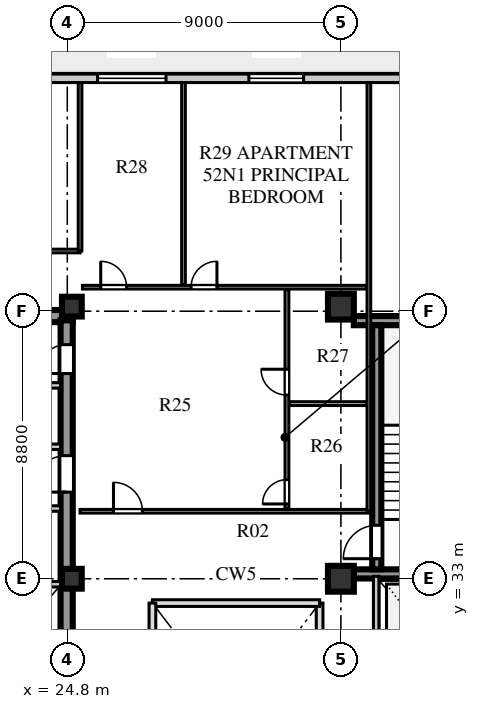
"""IFC4 building model, lengths in metres.
Left out: names, types, materials, properties, quantities, classifications, styles, units other than length and angle.
Written with IfcOpenShell. Run it as: python <this file> out.ifc"""

import sys

from ifc_helpers import new_model, si_unit, direction, frame, frame_2d, origin, origin_2d, place, context, subcontext, project, spatial, rectangle, extrude, element, fill, save


model = new_model("IFC4")
c1 = context("Model", 3, precision=1e-05, world=origin(), true_north=direction((0.0, 1.0)))
c2 = subcontext(c1, "Body", "Model", "MODEL_VIEW")
j1 = project(units=[si_unit("LENGTHUNIT", "METRE"), si_unit("PLANEANGLEUNIT", "RADIAN")], contexts=[c1])
p1 = place(None, origin())
s1 = spatial("IfcSite", under=j1, at=p1, CompositionType="ELEMENT")
p2 = place(p1, origin())
s2 = spatial("IfcBuilding", under=s1, at=p2, CompositionType="ELEMENT")
p3 = place(p2, frame((0.0, 0.0, 214.1)))
s3 = spatial("IfcBuildingStorey", under=s2, at=p3, CompositionType="ELEMENT", Elevation=214.1)
p4 = place(p3, frame((15.5, 41.64, 0.0), z_axis=(0.0, 0.0, 1.0), x_axis=(1.0, 0.0, 0.0)))
e1 = element("IfcWall", 1, at=p4, inside=s3, PredefinedType="SHEAR", context=c2, shape_type="SweptSolid", body=[
    extrude(rectangle(XDim=9.48, YDim=0.4, at=frame_2d((4.74, 0.0))), origin(), (0.0, 0.0, 1.0), 3.66),
])
p5 = place(p3, frame((24.78, 15.74, 0.0), z_axis=(0.0, 0.0, 1.0), x_axis=(0.0, 1.0, 0.0)))
e2 = element("IfcWall", 2, at=p5, inside=s3, PredefinedType="SHEAR", context=c2, shape_type="SweptSolid", body=[
    extrude(rectangle(XDim=25.76, YDim=0.4, at=frame_2d((12.88, 0.0))), origin(), (0.0, 0.0, 1.0), 3.66),
])
p6 = place(p5, frame((1.61, 0.0, 0.0)))
e3 = element("IfcOpeningElement", 3, at=p6, cuts=e2, PredefinedType="OPENING", context=c2, shape_type="SweptSolid", body=[
    extrude(rectangle(XDim=1.2, YDim=2.1, at=frame_2d((0.6, 1.05))), frame((0.0, 0.21, 0.0), z_axis=(0.0, -1.0, 0.0), x_axis=(1.0, 0.0, 0.0)), (0.0, 0.0, 1.0), 0.42),
])
p7 = place(p5, frame((6.78, 0.0, 0.0)))
e4 = element("IfcOpeningElement", 4, at=p7, cuts=e2, PredefinedType="OPENING", context=c2, shape_type="SweptSolid", body=[
    extrude(rectangle(XDim=0.85, YDim=2.06, at=frame_2d((0.425, 1.03))), frame((0.0, 0.21, 0.0), z_axis=(0.0, -1.0, 0.0), x_axis=(1.0, 0.0, 0.0)), (0.0, 0.0, 1.0), 0.42),
])
p8 = place(p5, frame((12.11, 0.0, 0.0)))
e5 = element("IfcOpeningElement", 5, at=p8, cuts=e2, PredefinedType="OPENING", context=c2, shape_type="SweptSolid", body=[
    extrude(rectangle(XDim=1.5, YDim=2.12, at=frame_2d((0.75, 1.06))), frame((0.0, 0.21, 0.0), z_axis=(0.0, -1.0, 0.0), x_axis=(1.0, 0.0, 0.0)), (0.0, 0.0, 1.0), 0.42),
])
p9 = place(p5, frame((20.11, 0.0, 0.0)))
e6 = element("IfcOpeningElement", 6, at=p9, cuts=e2, PredefinedType="OPENING", context=c2, shape_type="SweptSolid", body=[
    extrude(rectangle(XDim=1.2, YDim=2.12, at=frame_2d((0.6, 1.06))), frame((0.0, 0.21, 0.0), z_axis=(0.0, -1.0, 0.0), x_axis=(1.0, 0.0, 0.0)), (0.0, 0.0, 1.0), 0.42),
])
p10 = place(p5, frame((24.01, 0.0, 0.0)))
e7 = element("IfcOpeningElement", 7, at=p10, cuts=e2, PredefinedType="OPENING", context=c2, shape_type="SweptSolid", body=[
    extrude(rectangle(XDim=0.95, YDim=2.1, at=frame_2d((0.475, 1.05))), frame((0.0, 0.21, 0.0), z_axis=(0.0, -1.0, 0.0), x_axis=(1.0, 0.0, 0.0)), (0.0, 0.0, 1.0), 0.42),
])
for number, where, z_axis, x_axis in (
    (8, (34.225, 33.16, 0.0), (0.0, 0.0, 1.0), (1.0, 0.0, 0.0)),
    (9, (34.225, 41.49, 0.0), (0.0, 0.0, 1.0), (1.0, 0.0, 0.0)),
):
    element("IfcWall", number, at=place(p3, frame(where, z_axis=z_axis, x_axis=x_axis)), inside=s3, PredefinedType="SHEAR", context=c2, shape_type="SweptSolid", body=[
        extrude(rectangle(XDim=4.645, YDim=0.3, at=frame_2d((2.323, 0.0))), origin(), (0.0, 0.0, 1.0), 3.66),
    ])
p11 = place(p3, frame((34.98, 33.31, 0.0), z_axis=(0.0, 0.0, 1.0), x_axis=(0.0, 1.0, 0.0)))
e10 = element("IfcWall", 10, at=p11, inside=s3, PredefinedType="SHEAR", context=c2, shape_type="SweptSolid", body=[
    extrude(rectangle(XDim=8.03, YDim=0.3, at=frame_2d((4.015, 0.0))), origin(), (0.0, 0.0, 1.0), 3.66),
])
p12 = place(p11, frame((0.35, 0.0, 0.0)))
e11 = element("IfcOpeningElement", 11, at=p12, cuts=e10, PredefinedType="OPENING", context=c2, shape_type="SweptSolid", body=[
    extrude(rectangle(XDim=1.1, YDim=2.1, at=frame_2d((0.55, 1.05))), frame((0.0, 0.16, 0.0), z_axis=(0.0, -1.0, 0.0), x_axis=(1.0, 0.0, 0.0)), (0.0, 0.0, 1.0), 0.32),
])
for number, where, z_axis, x_axis in (
    (12, (24.95, 33.0, 0.0), (0.0, 0.0, 1.0), (1.0, 0.0, 0.0)),
    (13, (24.95, 41.95, 0.0), (0.0, 0.0, 1.0), (1.0, 0.0, 0.0)),
):
    element("IfcColumn", number, at=place(p3, frame(where, z_axis=z_axis, x_axis=x_axis)), inside=s3, PredefinedType="COLUMN", context=c2, shape_type="SweptSolid", body=[
        extrude(rectangle(XDim=0.65, YDim=0.65, at=origin_2d()), origin(), (0.0, 0.0, 1.0), 3.66),
    ])
for number, where, z_axis, x_axis in (
    (14, (33.8, 33.0, 0.0), (0.0, 0.0, 1.0), (1.0, 0.0, 0.0)),
    (15, (33.8, 41.95, 0.0), (0.0, 0.0, 1.0), (1.0, 0.0, 0.0)),
):
    element("IfcColumn", number, at=place(p3, frame(where, z_axis=z_axis, x_axis=x_axis)), inside=s3, PredefinedType="COLUMN", context=c2, shape_type="SweptSolid", body=[
        extrude(rectangle(XDim=0.85, YDim=0.85, at=origin_2d()), origin(), (0.0, 0.0, 1.0), 3.66),
    ])
p13 = place(p3, frame((45.55, 49.46, 0.0), z_axis=(0.0, 0.0, 1.0), x_axis=(-1.0, 0.0, 0.0)))
e16 = element("IfcWall", 16, at=p13, inside=s3, PredefinedType="STANDARD", context=c2, shape_type="SweptSolid", body=[
    extrude(rectangle(XDim=32.5, YDim=0.28, at=frame_2d((16.25, 0.0))), origin(), (0.0, 0.0, 1.0), 3.66),
])
p14 = place(p13, frame((30.55, 0.0, 0.0)))
e17 = element("IfcOpeningElement", 17, at=p14, cuts=e16, PredefinedType="OPENING", context=c2, shape_type="SweptSolid", body=[
    extrude(rectangle(XDim=1.0, YDim=2.05, at=frame_2d((0.5, 1.025))), frame((0.0, 0.15, 0.0), z_axis=(0.0, -1.0, 0.0), x_axis=(1.0, 0.0, 0.0)), (0.0, 0.0, 1.0), 0.3),
])
p15 = place(p13, frame((24.49, 0.0, 0.8)))
e18 = element("IfcOpeningElement", 18, at=p15, cuts=e16, PredefinedType="OPENING", context=c2, shape_type="SweptSolid", body=[
    extrude(rectangle(XDim=1.95, YDim=2.0, at=frame_2d((0.975, 1.0))), frame((0.0, 0.15, 0.0), z_axis=(0.0, -1.0, 0.0), x_axis=(1.0, 0.0, 0.0)), (0.0, 0.0, 1.0), 0.3),
])
p16 = place(p13, frame((17.503, 0.0, 0.8)))
e19 = element("IfcOpeningElement", 19, at=p16, cuts=e16, PredefinedType="OPENING", context=c2, shape_type="SweptSolid", body=[
    extrude(rectangle(XDim=2.25, YDim=2.0, at=frame_2d((1.125, 1.0))), frame((0.0, 0.15, 0.0), z_axis=(0.0, -1.0, 0.0), x_axis=(1.0, 0.0, 0.0)), (0.0, 0.0, 1.0), 0.3),
])
p17 = place(p13, frame((12.978, 0.0, 0.8)))
e20 = element("IfcOpeningElement", 20, at=p17, cuts=e16, PredefinedType="OPENING", context=c2, shape_type="SweptSolid", body=[
    extrude(rectangle(XDim=1.8, YDim=2.0, at=frame_2d((0.9, 1.0))), frame((0.0, 0.15, 0.0), z_axis=(0.0, -1.0, 0.0), x_axis=(1.0, 0.0, 0.0)), (0.0, 0.0, 1.0), 0.3),
])
p18 = place(p13, frame((4.72, 0.0, 0.8)))
e21 = element("IfcOpeningElement", 21, at=p18, cuts=e16, PredefinedType="OPENING", context=c2, shape_type="SweptSolid", body=[
    extrude(rectangle(XDim=1.5, YDim=2.0, at=frame_2d((0.75, 1.0))), frame((0.0, 0.15, 0.0), z_axis=(0.0, -1.0, 0.0), x_axis=(1.0, 0.0, 0.0)), (0.0, 0.0, 1.0), 0.3),
])
p19 = place(p3, frame((15.9, 32.82, 0.0), z_axis=(0.0, 0.0, 1.0), x_axis=(1.0, 0.0, 0.0)))
e22 = element("IfcWall", 22, at=p19, inside=s3, PredefinedType="SOLIDWALL", context=c2, shape_type="SweptSolid", body=[
    extrude(rectangle(XDim=8.68, YDim=0.18, at=frame_2d((4.34, 0.0))), origin(), (0.0, 0.0, 1.0), 3.06),
])
p20 = place(p3, frame((22.02, 35.31, 0.0), z_axis=(0.0, 0.0, 1.0), x_axis=(1.0, 0.0, 0.0)))
e23 = element("IfcWall", 23, at=p20, inside=s3, PredefinedType="SOLIDWALL", context=c2, shape_type="SweptSolid", body=[
    extrude(rectangle(XDim=2.56, YDim=0.18, at=frame_2d((1.28, 0.0))), origin(), (0.0, 0.0, 1.0), 3.66),
])
p21 = place(p20, frame((0.55, 0.0, 0.0)))
e24 = element("IfcOpeningElement", 24, at=p21, cuts=e23, PredefinedType="OPENING", context=c2, shape_type="SweptSolid", body=[
    extrude(rectangle(XDim=1.0, YDim=2.1, at=frame_2d((0.5, 1.05))), frame((0.0, 0.1, 0.0), z_axis=(0.0, -1.0, 0.0), x_axis=(1.0, 0.0, 0.0)), (0.0, 0.0, 1.0), 0.2),
])
p22 = place(p3, frame((19.64, 37.34, 0.0), z_axis=(0.0, 0.0, 1.0), x_axis=(1.0, 0.0, 0.0)))
e25 = element("IfcWall", 25, at=p22, inside=s3, PredefinedType="SOLIDWALL", context=c2, shape_type="SweptSolid", body=[
    extrude(rectangle(XDim=4.94, YDim=0.18, at=frame_2d((2.47, 0.0))), origin(), (0.0, 0.0, 1.0), 3.66),
])
p23 = place(p22, frame((0.45, 0.0, 0.0)))
e26 = element("IfcOpeningElement", 26, at=p23, cuts=e25, PredefinedType="OPENING", context=c2, shape_type="SweptSolid", body=[
    extrude(rectangle(XDim=1.0, YDim=2.1, at=frame_2d((0.5, 1.05))), frame((0.0, 0.1, 0.0), z_axis=(0.0, -1.0, 0.0), x_axis=(1.0, 0.0, 0.0)), (0.0, 0.0, 1.0), 0.2),
])
p24 = place(p22, frame((2.5, 0.0, 0.0)))
e27 = element("IfcOpeningElement", 27, at=p24, cuts=e25, PredefinedType="OPENING", context=c2, shape_type="SweptSolid", body=[
    extrude(rectangle(XDim=1.0, YDim=2.1, at=frame_2d((0.5, 1.05))), frame((0.0, 0.1, 0.0), z_axis=(0.0, -1.0, 0.0), x_axis=(1.0, 0.0, 0.0)), (0.0, 0.0, 1.0), 0.2),
])
p25 = place(p3, frame((19.64, 39.36, 0.0), z_axis=(0.0, 0.0, 1.0), x_axis=(1.0, 0.0, 0.0)))
e28 = element("IfcWall", 28, at=p25, inside=s3, PredefinedType="SOLIDWALL", context=c2, shape_type="SweptSolid", body=[
    extrude(rectangle(XDim=4.94, YDim=0.18, at=frame_2d((2.47, 0.0))), origin(), (0.0, 0.0, 1.0), 3.66),
])
p26 = place(p3, frame((34.96, 28.86, 0.0), z_axis=(0.0, 0.0, 1.0), x_axis=(0.0, 1.0, 0.0)))
e29 = element("IfcWall", 29, at=p26, inside=s3, PredefinedType="SOLIDWALL", context=c2, shape_type="SweptSolid", body=[
    extrude(rectangle(XDim=4.22, YDim=0.18, at=frame_2d((2.11, 0.0))), origin(), (0.0, 0.0, 1.0), 3.66),
])
p27 = place(p3, frame((25.22, 35.22, 0.0), z_axis=(0.0, 0.0, 1.0), x_axis=(1.0, 0.0, 0.0)))
e30 = element("IfcWall", 30, at=p27, inside=s3, PredefinedType="PARTITIONING", context=c2, shape_type="SweptSolid", body=[
    extrude(rectangle(XDim=9.5, YDim=0.12, at=frame_2d((4.75, 0.0))), origin(), (0.0, 0.0, 1.0), 3.66),
])
p28 = place(p27, frame((1.1, 0.0, 0.0)))
e31 = element("IfcOpeningElement", 31, at=p28, cuts=e30, PredefinedType="OPENING", context=c2, shape_type="SweptSolid", body=[
    extrude(rectangle(XDim=0.95, YDim=2.1, at=frame_2d((0.475, 1.05))), frame((0.0, 0.07, 0.0), z_axis=(0.0, -1.0, 0.0), x_axis=(1.0, 0.0, 0.0)), (0.0, 0.0, 1.0), 0.14),
])
p29 = place(p3, frame((13.4, 43.78, 0.0), z_axis=(0.0, 0.0, 1.0), x_axis=(1.0, 0.0, 0.0)))
e32 = element("IfcWall", 32, at=p29, inside=s3, PredefinedType="PARTITIONING", context=c2, shape_type="SweptSolid", body=[
    extrude(rectangle(XDim=11.82, YDim=0.12, at=frame_2d((5.91, 0.0))), origin(), (0.0, 0.0, 1.0), 3.66),
])
p30 = place(p29, frame((3.2, 0.0, 0.0)))
e33 = element("IfcOpeningElement", 33, at=p30, cuts=e32, PredefinedType="OPENING", context=c2, shape_type="SweptSolid", body=[
    extrude(rectangle(XDim=0.95, YDim=2.08, at=frame_2d((0.475, 1.04))), frame((0.0, 0.07, 0.0), z_axis=(0.0, -1.0, 0.0), x_axis=(1.0, 0.0, 0.0)), (0.0, 0.0, 1.0), 0.14),
])
p31 = place(p3, frame((25.22, 43.78, 0.0), z_axis=(0.0, 0.0, 1.0), x_axis=(0.0, 1.0, 0.0)))
e34 = element("IfcWall", 34, at=p31, inside=s3, PredefinedType="PARTITIONING", context=c2, shape_type="SweptSolid", body=[
    extrude(rectangle(XDim=5.54, YDim=0.12, at=frame_2d((2.77, 0.0))), origin(), (0.0, 0.0, 1.0), 3.21),
])
p32 = place(p3, frame((34.72, 35.22, 0.0), z_axis=(0.0, 0.0, 1.0), x_axis=(0.0, 1.0, 0.0)))
e35 = element("IfcWall", 35, at=p32, inside=s3, PredefinedType="PARTITIONING", context=c2, shape_type="SweptSolid", body=[
    extrude(rectangle(XDim=14.1, YDim=0.12, at=frame_2d((7.05, 0.0))), origin(), (0.0, 0.0, 1.0), 3.66),
])
p33 = place(p3, frame((25.3, 42.59, 0.0), z_axis=(0.0, 0.0, 1.0), x_axis=(1.0, 0.0, 0.0)))
e36 = element("IfcWall", 36, at=p33, inside=s3, PredefinedType="PARTITIONING", context=c2, shape_type="SweptSolid", body=[
    extrude(rectangle(XDim=9.34, YDim=0.12, at=frame_2d((4.67, 0.0))), origin(), (0.0, 0.0, 1.0), 3.66),
])
p34 = place(p33, frame((0.6, 0.0, 0.0)))
e37 = element("IfcOpeningElement", 37, at=p34, cuts=e36, PredefinedType="OPENING", context=c2, shape_type="SweptSolid", body=[
    extrude(rectangle(XDim=0.85, YDim=2.08, at=frame_2d((0.425, 1.04))), frame((0.0, 0.07, 0.0), z_axis=(0.0, -1.0, 0.0), x_axis=(1.0, 0.0, 0.0)), (0.0, 0.0, 1.0), 0.14),
])
p35 = place(p33, frame((3.573, 0.0, 0.0)))
e38 = element("IfcOpeningElement", 38, at=p35, cuts=e36, PredefinedType="OPENING", context=c2, shape_type="SweptSolid", body=[
    extrude(rectangle(XDim=0.85, YDim=2.08, at=frame_2d((0.425, 1.04))), frame((0.0, 0.07, 0.0), z_axis=(0.0, -1.0, 0.0), x_axis=(1.0, 0.0, 0.0)), (0.0, 0.0, 1.0), 0.14),
])
p36 = place(p3, frame((32.025, 35.3, 0.0), z_axis=(0.0, 0.0, 1.0), x_axis=(0.0, 1.0, 0.0)))
e39 = element("IfcWall", 39, at=p36, inside=s3, PredefinedType="PLUMBINGWALL", context=c2, shape_type="SweptSolid", body=[
    extrude(rectangle(XDim=7.21, YDim=0.125, at=frame_2d((3.605, 0.0))), origin(), (0.0, 0.0, 1.0), 3.66),
])
p37 = place(p36, frame((0.16, 0.0, 0.0)))
e40 = element("IfcOpeningElement", 40, at=p37, cuts=e39, PredefinedType="OPENING", context=c2, shape_type="SweptSolid", body=[
    extrude(rectangle(XDim=0.8, YDim=2.05, at=frame_2d((0.4, 1.025))), frame((0.0, 0.073, 0.0), z_axis=(0.0, -1.0, 0.0), x_axis=(1.0, 0.0, 0.0)), (0.0, 0.0, 1.0), 0.145),
])
p38 = place(p36, frame((3.741, 0.0, 0.0)))
e41 = element("IfcOpeningElement", 41, at=p38, cuts=e39, PredefinedType="OPENING", context=c2, shape_type="SweptSolid", body=[
    extrude(rectangle(XDim=0.85, YDim=2.08, at=frame_2d((0.425, 1.04))), frame((0.0, 0.073, 0.0), z_axis=(0.0, -1.0, 0.0), x_axis=(1.0, 0.0, 0.0)), (0.0, 0.0, 1.0), 0.145),
])
p39 = place(p3, frame((32.105, 38.761, 0.0), z_axis=(0.0, 0.0, 1.0), x_axis=(1.0, 0.0, 0.0)))
e42 = element("IfcWall", 42, at=p39, inside=s3, PredefinedType="PLUMBINGWALL", context=c2, shape_type="SweptSolid", body=[
    extrude(rectangle(XDim=2.535, YDim=0.125, at=frame_2d((1.268, 0.0))), origin(), (0.0, 0.0, 1.0), 3.66),
])
p40 = place(p3, frame((28.623, 42.67, 0.0), z_axis=(0.0, 0.0, 1.0), x_axis=(0.0, 1.0, 0.0)))
e43 = element("IfcWall", 43, at=p40, inside=s3, PredefinedType="PARTITIONING", context=c2, shape_type="SweptSolid", body=[
    extrude(rectangle(XDim=6.65, YDim=0.12, at=frame_2d((3.325, 0.0))), origin(), (0.0, 0.0, 1.0), 3.66),
])
p41 = place(p16, origin())
e44 = element("IfcWindow", 44, at=p41, inside=s3, PartitioningType="SINGLE_PANEL", PredefinedType="WINDOW", context=c2, shape_type="SweptSolid", body=[
    extrude(rectangle(XDim=2.25, YDim=2.0, at=frame_2d((1.125, 1.0))), frame((0.0, 0.03, 0.0), z_axis=(0.0, -1.0, 0.0), x_axis=(1.0, 0.0, 0.0)), (0.0, 0.0, 1.0), 0.06),
])
fill(e19, e44)
p42 = place(p17, origin())
e45 = element("IfcWindow", 45, at=p42, inside=s3, PartitioningType="SINGLE_PANEL", PredefinedType="WINDOW", context=c2, shape_type="SweptSolid", body=[
    extrude(rectangle(XDim=1.8, YDim=2.0, at=frame_2d((0.9, 1.0))), frame((0.0, 0.03, 0.0), z_axis=(0.0, -1.0, 0.0), x_axis=(1.0, 0.0, 0.0)), (0.0, 0.0, 1.0), 0.06),
])
fill(e20, e45)
p43 = place(p9, frame((1.2, 0.0, 0.0), z_axis=(0.0, 0.0, 1.0), x_axis=(-1.0, 0.0, 0.0)))
e46 = element("IfcDoor", 46, at=p43, inside=s3, OperationType="SINGLE_SWING_RIGHT", PredefinedType="DOOR", context=c2, shape_type="SweptSolid", body=[
    extrude(rectangle(XDim=1.2, YDim=2.12, at=frame_2d((0.6, 1.06))), frame((0.0, 0.025, 0.0), z_axis=(0.0, -1.0, 0.0), x_axis=(1.0, 0.0, 0.0)), (0.0, 0.0, 1.0), 0.05),
])
fill(e6, e46)
p44 = place(p10, frame((0.95, 0.0, 0.0), z_axis=(0.0, 0.0, 1.0), x_axis=(-1.0, 0.0, 0.0)))
e47 = element("IfcDoor", 47, at=p44, inside=s3, OperationType="SINGLE_SWING_RIGHT", PredefinedType="DOOR", context=c2, shape_type="SweptSolid", body=[
    extrude(rectangle(XDim=0.95, YDim=2.1, at=frame_2d((0.475, 1.05))), frame((0.0, 0.025, 0.0), z_axis=(0.0, -1.0, 0.0), x_axis=(1.0, 0.0, 0.0)), (0.0, 0.0, 1.0), 0.05),
])
fill(e7, e47)
p45 = place(p12, origin())
e48 = element("IfcDoor", 48, at=p45, inside=s3, OperationType="SINGLE_SWING_LEFT", PredefinedType="DOOR", context=c2, shape_type="SweptSolid", body=[
    extrude(rectangle(XDim=1.1, YDim=2.1, at=frame_2d((0.55, 1.05))), frame((0.0, 0.025, 0.0), z_axis=(0.0, -1.0, 0.0), x_axis=(1.0, 0.0, 0.0)), (0.0, 0.0, 1.0), 0.05),
])
fill(e11, e48)
p46 = place(p37, origin())
e49 = element("IfcDoor", 49, at=p46, inside=s3, OperationType="SINGLE_SWING_LEFT", PredefinedType="DOOR", context=c2, shape_type="SweptSolid", body=[
    extrude(rectangle(XDim=0.8, YDim=2.05, at=frame_2d((0.4, 1.025))), frame((0.0, 0.025, 0.0), z_axis=(0.0, -1.0, 0.0), x_axis=(1.0, 0.0, 0.0)), (0.0, 0.0, 1.0), 0.05),
])
fill(e40, e49)
p47 = place(p38, origin())
e50 = element("IfcDoor", 50, at=p47, inside=s3, OperationType="SINGLE_SWING_RIGHT", PredefinedType="DOOR", context=c2, shape_type="SweptSolid", body=[
    extrude(rectangle(XDim=0.85, YDim=2.08, at=frame_2d((0.425, 1.04))), frame((0.0, 0.025, 0.0), z_axis=(0.0, -1.0, 0.0), x_axis=(1.0, 0.0, 0.0)), (0.0, 0.0, 1.0), 0.05),
])
fill(e41, e50)
p48 = place(p34, origin())
e51 = element("IfcDoor", 51, at=p48, inside=s3, OperationType="SINGLE_SWING_LEFT", PredefinedType="DOOR", context=c2, shape_type="SweptSolid", body=[
    extrude(rectangle(XDim=0.85, YDim=2.08, at=frame_2d((0.425, 1.04))), frame((0.0, 0.025, 0.0), z_axis=(0.0, -1.0, 0.0), x_axis=(1.0, 0.0, 0.0)), (0.0, 0.0, 1.0), 0.05),
])
fill(e37, e51)
p49 = place(p35, origin())
e52 = element("IfcDoor", 52, at=p49, inside=s3, OperationType="SINGLE_SWING_RIGHT", PredefinedType="DOOR", context=c2, shape_type="SweptSolid", body=[
    extrude(rectangle(XDim=0.85, YDim=2.08, at=frame_2d((0.425, 1.04))), frame((0.0, 0.025, 0.0), z_axis=(0.0, -1.0, 0.0), x_axis=(1.0, 0.0, 0.0)), (0.0, 0.0, 1.0), 0.05),
])
fill(e38, e52)
p50 = place(p28, origin())
e53 = element("IfcDoor", 53, at=p50, inside=s3, OperationType="SINGLE_SWING_LEFT", PredefinedType="DOOR", context=c2, shape_type="SweptSolid", body=[
    extrude(rectangle(XDim=0.95, YDim=2.1, at=frame_2d((0.475, 1.05))), frame((0.0, 0.025, 0.0), z_axis=(0.0, -1.0, 0.0), x_axis=(1.0, 0.0, 0.0)), (0.0, 0.0, 1.0), 0.05),
])
fill(e31, e53)
save(model, sys.argv[1])
